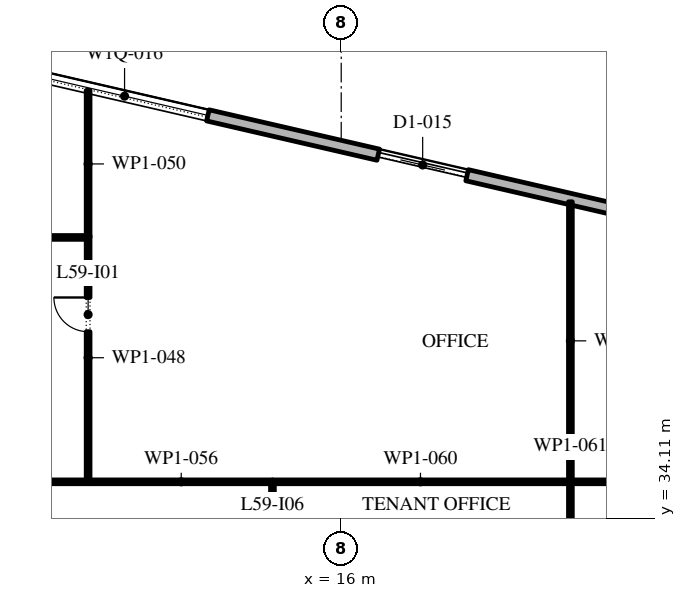
"""IFC4 building model, lengths in metres.
Left out: names, types, materials, properties, quantities, classifications, styles, units other than length and angle.
Written with IfcOpenShell. Run it as: python <this file> out.ifc"""

import sys

from ifc_helpers import new_model, si_unit, direction, frame, frame_2d, origin, place, context, subcontext, project, spatial, rectangle, extrude, element, fill, save


model = new_model("IFC4")
c1 = context("Model", 3, precision=1e-05, world=origin(), true_north=direction((0.0, 1.0)))
c2 = subcontext(c1, "Body", "Model", "MODEL_VIEW")
j1 = project(units=[si_unit("LENGTHUNIT", "METRE"), si_unit("PLANEANGLEUNIT", "RADIAN")], contexts=[c1])
p1 = place(None, origin())
s1 = spatial("IfcSite", under=j1, at=p1, CompositionType="ELEMENT")
p2 = place(p1, origin())
s2 = spatial("IfcBuilding", under=s1, at=p2, CompositionType="ELEMENT")
p3 = place(p2, frame((0.0, 0.0, 272.4)))
s3 = spatial("IfcBuildingStorey", under=s2, at=p3, CompositionType="ELEMENT", Elevation=272.4)
p4 = place(p3, frame((21.359, -11.678, 0.0), z_axis=(0.0, 0.0, 1.0), x_axis=(0.224949198343, 0.974370493275, 0.0)))
e1 = element("IfcWall", 1, at=p4, inside=s3, PredefinedType="STANDARD", context=c2, shape_type="SweptSolid", body=[
    extrude(rectangle(XDim=49.5, YDim=0.3, at=frame_2d((24.75, 0.0))), origin(), (0.0, 0.0, 1.0), 4.0),
])
p5 = place(p4, frame((1.157, 0.0, 0.45)))
e2 = element("IfcOpeningElement", 2, at=p5, cuts=e1, PredefinedType="OPENING", context=c2, shape_type="SweptSolid", body=[
    extrude(rectangle(XDim=4.5, YDim=3.05, at=frame_2d((2.25, 1.525))), frame((0.0, 0.16, 0.0), z_axis=(0.0, -1.0, 0.0), x_axis=(1.0, 0.0, 0.0)), (0.0, 0.0, 1.0), 0.32),
])
p6 = place(p4, frame((8.121, 0.0, 0.45)))
e3 = element("IfcOpeningElement", 3, at=p6, cuts=e1, PredefinedType="OPENING", context=c2, shape_type="SweptSolid", body=[
    extrude(rectangle(XDim=4.5, YDim=3.05, at=frame_2d((2.25, 1.525))), frame((0.0, 0.16, 0.0), z_axis=(0.0, -1.0, 0.0), x_axis=(1.0, 0.0, 0.0)), (0.0, 0.0, 1.0), 0.32),
])
p7 = place(p4, frame((15.236, 0.0, 0.45)))
e4 = element("IfcOpeningElement", 4, at=p7, cuts=e1, PredefinedType="OPENING", context=c2, shape_type="SweptSolid", body=[
    extrude(rectangle(XDim=4.5, YDim=3.05, at=frame_2d((2.25, 1.525))), frame((0.0, 0.16, 0.0), z_axis=(0.0, -1.0, 0.0), x_axis=(1.0, 0.0, 0.0)), (0.0, 0.0, 1.0), 0.32),
])
p8 = place(p4, frame((22.35, 0.0, 0.45)))
e5 = element("IfcOpeningElement", 5, at=p8, cuts=e1, PredefinedType="OPENING", context=c2, shape_type="SweptSolid", body=[
    extrude(rectangle(XDim=4.5, YDim=3.05, at=frame_2d((2.25, 1.525))), frame((0.0, 0.16, 0.0), z_axis=(0.0, -1.0, 0.0), x_axis=(1.0, 0.0, 0.0)), (0.0, 0.0, 1.0), 0.32),
])
p9 = place(p4, frame((29.464, 0.0, 0.45)))
e6 = element("IfcOpeningElement", 6, at=p9, cuts=e1, PredefinedType="OPENING", context=c2, shape_type="SweptSolid", body=[
    extrude(rectangle(XDim=4.5, YDim=2.95, at=frame_2d((2.25, 1.475))), frame((0.0, 0.16, 0.0), z_axis=(0.0, -1.0, 0.0), x_axis=(1.0, 0.0, 0.0)), (0.0, 0.0, 1.0), 0.32),
])
p10 = place(p4, frame((37.628, 0.0, 0.0)))
e7 = element("IfcOpeningElement", 7, at=p10, cuts=e1, PredefinedType="OPENING", context=c2, shape_type="SweptSolid", body=[
    extrude(rectangle(XDim=2.4, YDim=3.325, at=frame_2d((1.2, 1.663))), frame((0.0, 0.16, 0.0), z_axis=(0.0, -1.0, 0.0), x_axis=(1.0, 0.0, 0.0)), (0.0, 0.0, 1.0), 0.32),
])
p11 = place(p4, frame((43.693, 0.0, 0.45)))
e8 = element("IfcOpeningElement", 8, at=p11, cuts=e1, PredefinedType="OPENING", context=c2, shape_type="SweptSolid", body=[
    extrude(rectangle(XDim=4.5, YDim=3.05, at=frame_2d((2.25, 1.525))), frame((0.0, 0.16, 0.0), z_axis=(0.0, -1.0, 0.0), x_axis=(1.0, 0.0, 0.0)), (0.0, 0.0, 1.0), 0.32),
])
p12 = place(p3, frame((29.616, 40.758, 0.0), z_axis=(0.0, 0.0, 1.0), x_axis=(-0.974370532314, 0.224949029246, 0.0)))
e9 = element("IfcWall", 9, at=p12, inside=s3, PredefinedType="STANDARD", context=c2, shape_type="SweptSolid", body=[
    extrude(rectangle(XDim=48.0, YDim=0.3, at=frame_2d((24.0, 0.0))), origin(), (0.0, 0.0, 1.0), 4.0),
])
p13 = place(p12, frame((1.625, 0.0, 0.45)))
e10 = element("IfcOpeningElement", 10, at=p13, cuts=e9, PredefinedType="OPENING", context=c2, shape_type="SweptSolid", body=[
    extrude(rectangle(XDim=4.5, YDim=2.575, at=frame_2d((2.25, 1.288))), frame((0.0, 0.16, 0.0), z_axis=(0.0, -1.0, 0.0), x_axis=(1.0, 0.0, 0.0)), (0.0, 0.0, 1.0), 0.32),
])
p14 = place(p12, frame((10.575, 0.0, 0.0)))
e11 = element("IfcOpeningElement", 11, at=p14, cuts=e9, PredefinedType="OPENING", context=c2, shape_type="SweptSolid", body=[
    extrude(rectangle(XDim=2.4, YDim=3.5, at=frame_2d((1.2, 1.75))), frame((0.0, 0.16, 0.0), z_axis=(0.0, -1.0, 0.0), x_axis=(1.0, 0.0, 0.0)), (0.0, 0.0, 1.0), 0.32),
])
p15 = place(p12, frame((17.575, 0.0, 0.45)))
e12 = element("IfcOpeningElement", 12, at=p15, cuts=e9, PredefinedType="OPENING", context=c2, shape_type="SweptSolid", body=[
    extrude(rectangle(XDim=4.5, YDim=2.45, at=frame_2d((2.25, 1.225))), frame((0.0, 0.16, 0.0), z_axis=(0.0, -1.0, 0.0), x_axis=(1.0, 0.0, 0.0)), (0.0, 0.0, 1.0), 0.32),
])
p16 = place(p12, frame((25.625, 0.0, 0.45)))
e13 = element("IfcOpeningElement", 13, at=p16, cuts=e9, PredefinedType="OPENING", context=c2, shape_type="SweptSolid", body=[
    extrude(rectangle(XDim=4.5, YDim=2.45, at=frame_2d((2.25, 1.225))), frame((0.0, 0.16, 0.0), z_axis=(0.0, -1.0, 0.0), x_axis=(1.0, 0.0, 0.0)), (0.0, 0.0, 1.0), 0.32),
])
p17 = place(p12, frame((33.675, 0.0, 0.45)))
e14 = element("IfcOpeningElement", 14, at=p17, cuts=e9, PredefinedType="OPENING", context=c2, shape_type="SweptSolid", body=[
    extrude(rectangle(XDim=4.5, YDim=2.45, at=frame_2d((2.25, 1.225))), frame((0.0, 0.16, 0.0), z_axis=(0.0, -1.0, 0.0), x_axis=(1.0, 0.0, 0.0)), (0.0, 0.0, 1.0), 0.32),
])
p18 = place(p12, frame((42.175, 0.0, 0.0)))
e15 = element("IfcOpeningElement", 15, at=p18, cuts=e9, PredefinedType="OPENING", context=c2, shape_type="SweptSolid", body=[
    extrude(rectangle(XDim=2.4, YDim=3.5, at=frame_2d((1.2, 1.75))), frame((0.0, 0.16, 0.0), z_axis=(0.0, -1.0, 0.0), x_axis=(1.0, 0.0, 0.0)), (0.0, 0.0, 1.0), 0.32),
])
p19 = place(p3, frame((9.39, 35.07, 0.0), z_axis=(0.0, 0.0, 1.0), x_axis=(-1.0, 0.0, 0.0)))
e16 = element("IfcWall", 16, at=p19, inside=s3, PredefinedType="PARTITIONING", context=c2, shape_type="SweptSolid", body=[
    extrude(rectangle(XDim=8.325, YDim=0.1, at=frame_2d((4.163, 0.0))), origin(), (0.0, 0.0, 1.0), 4.0),
])
p20 = place(p3, frame((9.34, 35.12, 0.0), z_axis=(0.0, 0.0, 1.0), x_axis=(0.0, 1.0, 0.0)))
e17 = element("IfcWall", 17, at=p20, inside=s3, PredefinedType="PARTITIONING", context=c2, shape_type="SweptSolid", body=[
    extrude(rectangle(XDim=6.43, YDim=0.1, at=frame_2d((3.215, 0.0))), origin(), (0.0, 0.0, 1.0), 4.0),
])
p21 = place(p20, frame((3.9, 0.0, 0.0)))
e18 = element("IfcOpeningElement", 18, at=p21, cuts=e17, PredefinedType="OPENING", context=c2, shape_type="SweptSolid", body=[
    extrude(rectangle(XDim=0.9, YDim=2.1, at=frame_2d((0.45, 1.05))), frame((0.0, 0.06, 0.0), z_axis=(0.0, -1.0, 0.0), x_axis=(1.0, 0.0, 0.0)), (0.0, 0.0, 1.0), 0.12),
])
p22 = place(p3, frame((9.29, 41.5, 0.0), z_axis=(0.0, 0.0, 1.0), x_axis=(-1.0, 0.0, 0.0)))
e19 = element("IfcWall", 19, at=p22, inside=s3, PredefinedType="PARTITIONING", context=c2, shape_type="SweptSolid", body=[
    extrude(rectangle(XDim=8.225, YDim=0.1, at=frame_2d((4.113, 0.0))), origin(), (0.0, 0.0, 1.0), 4.0),
])
p23 = place(p3, frame((9.34, 41.5, 0.0), z_axis=(0.0, 0.0, 1.0), x_axis=(0.0, 1.0, 0.0)))
e20 = element("IfcWall", 20, at=p23, inside=s3, PredefinedType="PARTITIONING", context=c2, shape_type="SweptSolid", body=[
    extrude(rectangle(XDim=3.868, YDim=0.1, at=frame_2d((1.934, 0.0))), origin(), (0.0, 0.0, 1.0), 4.0),
])
p24 = place(p3, frame((14.19, 35.07, 0.0), z_axis=(0.0, 0.0, 1.0), x_axis=(-1.0, 0.0, 0.0)))
e21 = element("IfcWall", 21, at=p24, inside=s3, PredefinedType="PARTITIONING", context=c2, shape_type="SweptSolid", body=[
    extrude(rectangle(XDim=4.8, YDim=0.1, at=frame_2d((2.4, 0.0))), origin(), (0.0, 0.0, 1.0), 4.0),
])
p25 = place(p3, frame((14.19, 35.02, 0.0), z_axis=(0.0, 0.0, 1.0), x_axis=(0.0, -1.0, 0.0)))
e22 = element("IfcWall", 22, at=p25, inside=s3, PredefinedType="PARTITIONING", context=c2, shape_type="SweptSolid", body=[
    extrude(rectangle(XDim=4.32, YDim=0.1, at=frame_2d((2.16, 0.0))), origin(), (0.0, 0.0, 1.0), 4.0),
])
p26 = place(p25, frame((1.22, 0.0, 0.0)))
e23 = element("IfcOpeningElement", 23, at=p26, cuts=e22, PredefinedType="OPENING", context=c2, shape_type="SweptSolid", body=[
    extrude(rectangle(XDim=0.9, YDim=2.1, at=frame_2d((0.45, 1.05))), frame((0.0, 0.06, 0.0), z_axis=(0.0, -1.0, 0.0), x_axis=(1.0, 0.0, 0.0)), (0.0, 0.0, 1.0), 0.12),
])
p27 = place(p3, frame((21.98, 35.07, 0.0), z_axis=(0.0, 0.0, 1.0), x_axis=(-1.0, 0.0, 0.0)))
e24 = element("IfcWall", 24, at=p27, inside=s3, PredefinedType="PARTITIONING", context=c2, shape_type="SweptSolid", body=[
    extrude(rectangle(XDim=7.79, YDim=0.1, at=frame_2d((3.895, 0.0))), origin(), (0.0, 0.0, 1.0), 4.0),
])
p28 = place(p3, frame((22.03, 35.02, 0.0), z_axis=(0.0, 0.0, 1.0), x_axis=(0.0, -1.0, 0.0)))
e25 = element("IfcWall", 25, at=p28, inside=s3, PredefinedType="PARTITIONING", context=c2, shape_type="SweptSolid", body=[
    extrude(rectangle(XDim=2.445, YDim=0.1, at=frame_2d((1.223, 0.0))), origin(), (0.0, 0.0, 1.0), 4.0),
])
p29 = place(p3, frame((21.98, 35.07, 0.0), z_axis=(0.0, 0.0, 1.0), x_axis=(1.0, 0.0, 0.0)))
e26 = element("IfcWall", 26, at=p29, inside=s3, PredefinedType="PARTITIONING", context=c2, shape_type="SweptSolid", body=[
    extrude(rectangle(XDim=8.55, YDim=0.1, at=frame_2d((4.275, 0.0))), origin(), (0.0, 0.0, 1.0), 4.0),
])
p30 = place(p29, frame((2.15, 0.0, 0.0)))
e27 = element("IfcOpeningElement", 27, at=p30, cuts=e26, PredefinedType="OPENING", context=c2, shape_type="SweptSolid", body=[
    extrude(rectangle(XDim=0.9, YDim=2.1, at=frame_2d((0.45, 1.05))), frame((0.0, 0.06, 0.0), z_axis=(0.0, -1.0, 0.0), x_axis=(1.0, 0.0, 0.0)), (0.0, 0.0, 1.0), 0.12),
])
p31 = place(p3, frame((22.03, 42.438, 0.0), z_axis=(0.0, 0.0, 1.0), x_axis=(0.0, -1.0, 0.0)))
e28 = element("IfcWall", 28, at=p31, inside=s3, PredefinedType="PARTITIONING", context=c2, shape_type="SweptSolid", body=[
    extrude(rectangle(XDim=7.318, YDim=0.1, at=frame_2d((3.659, 0.0))), origin(), (0.0, 0.0, 1.0), 4.0),
])
p32 = place(p14, origin())
e29 = element("IfcDoor", 29, at=p32, inside=s3, OperationType="DOUBLE_DOOR_SLIDING", PredefinedType="DOOR", context=c2, shape_type="SweptSolid", body=[
    extrude(rectangle(XDim=2.4, YDim=3.5, at=frame_2d((1.2, 1.75))), frame((0.0, 0.025, 0.0), z_axis=(0.0, -1.0, 0.0), x_axis=(1.0, 0.0, 0.0)), (0.0, 0.0, 1.0), 0.05),
])
fill(e11, e29)
p33 = place(p15, origin())
e30 = element("IfcWindow", 30, at=p33, inside=s3, PartitioningType="DOUBLE_PANEL_VERTICAL", PredefinedType="WINDOW", context=c2, shape_type="SweptSolid", body=[
    extrude(rectangle(XDim=4.5, YDim=2.45, at=frame_2d((2.25, 1.225))), frame((0.0, 0.03, 0.0), z_axis=(0.0, -1.0, 0.0), x_axis=(1.0, 0.0, 0.0)), (0.0, 0.0, 1.0), 0.06),
])
fill(e12, e30)
p34 = place(p21, origin())
e31 = element("IfcDoor", 31, at=p34, inside=s3, OperationType="SINGLE_SWING_LEFT", PredefinedType="DOOR", context=c2, shape_type="SweptSolid", body=[
    extrude(rectangle(XDim=0.9, YDim=2.1, at=frame_2d((0.45, 1.05))), frame((0.0, 0.025, 0.0), z_axis=(0.0, -1.0, 0.0), x_axis=(1.0, 0.0, 0.0)), (0.0, 0.0, 1.0), 0.05),
])
fill(e18, e31)
save(model, sys.argv[1])
